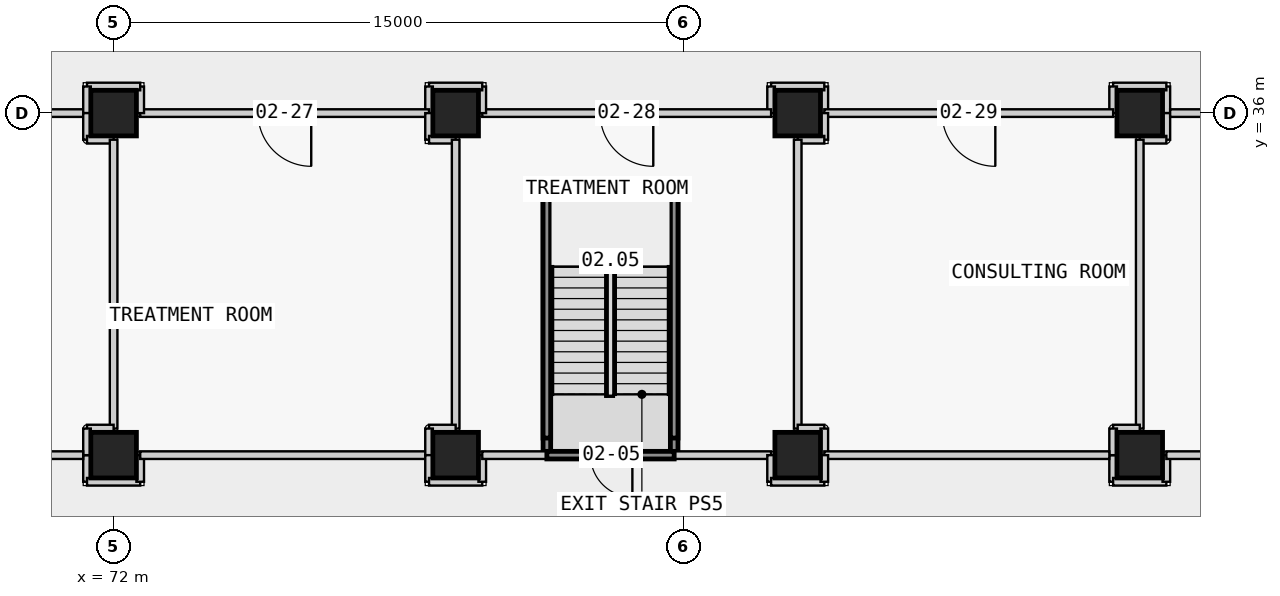
"""IFC4 building model, lengths in metres.
Left out: names, types, materials, properties, quantities, classifications, styles, units other than length and angle.
Written with IfcOpenShell. Run it as: python <this file> out.ifc"""

import sys

from ifc_helpers import new_model, si_unit, direction, frame, frame_2d, origin, origin_2d, place, context, subcontext, project, spatial, rectangle, extrude, element, fill, save


model = new_model("IFC4")
c1 = context("Model", 3, precision=1e-05, world=origin(), true_north=direction((0.0, 1.0)))
c2 = subcontext(c1, "Body", "Model", "MODEL_VIEW")
j1 = project(units=[si_unit("LENGTHUNIT", "METRE"), si_unit("PLANEANGLEUNIT", "RADIAN")], contexts=[c1])
p1 = place(None, origin())
s1 = spatial("IfcSite", under=j1, at=p1, CompositionType="ELEMENT")
p2 = place(p1, origin())
s2 = spatial("IfcBuilding", under=s1, at=p2, CompositionType="ELEMENT")
p3 = place(p2, frame((0.0, 0.0, 12.8)))
s3 = spatial("IfcBuildingStorey", under=s2, at=p3, CompositionType="ELEMENT", Elevation=12.8)
for number, where, z_axis, x_axis in (
    (1, (72.0, 27.0, 0.0), (0.0, 0.0, 1.0), (1.0, 0.0, 0.0)),
    (2, (72.0, 36.0, 0.0), (0.0, 0.0, 1.0), (1.0, 0.0, 0.0)),
    (3, (81.0, 27.0, 0.0), (0.0, 0.0, 1.0), (1.0, 0.0, 0.0)),
    (4, (81.0, 36.0, 0.0), (0.0, 0.0, 1.0), (1.0, 0.0, 0.0)),
    (5, (90.0, 27.0, 0.0), (0.0, 0.0, 1.0), (1.0, 0.0, 0.0)),
    (6, (90.0, 36.0, 0.0), (0.0, 0.0, 1.0), (1.0, 0.0, 0.0)),
    (7, (99.0, 27.0, 0.0), (0.0, 0.0, 1.0), (1.0, 0.0, 0.0)),
    (8, (99.0, 36.0, 0.0), (0.0, 0.0, 1.0), (1.0, 0.0, 0.0)),
):
    element("IfcColumn", number, at=place(p3, frame(where, z_axis=z_axis, x_axis=x_axis)), inside=s3, PredefinedType="COLUMN", context=c2, shape_type="SweptSolid", body=[
        extrude(rectangle(XDim=1.2, YDim=1.2, at=origin_2d()), origin(), (0.0, 0.0, 1.0), 4.5),
    ])
p4 = place(p3, frame((71.3, 36.0, 0.0), z_axis=(0.0, 0.0, 1.0), x_axis=(-1.0, 0.0, 0.0)))
e9 = element("IfcWall", 9, at=p4, inside=s3, PredefinedType="PARTITIONING", context=c2, shape_type="SweptSolid", body=[
    extrude(rectangle(XDim=7.6, YDim=0.2, at=frame_2d((3.8, 0.0))), origin(), (0.0, 0.0, 1.0), 3.45),
])
p5 = place(p4, frame((3.35, 0.0, 0.0)))
e10 = element("IfcOpeningElement", 10, at=p5, cuts=e9, PredefinedType="OPENING", context=c2, shape_type="SweptSolid", body=[
    extrude(rectangle(XDim=0.9, YDim=2.1, at=frame_2d((0.45, 1.05))), frame((0.0, 0.11, 0.0), z_axis=(0.0, -1.0, 0.0), x_axis=(1.0, 0.0, 0.0)), (0.0, 0.0, 1.0), 0.22),
])
p6 = place(p3, frame((83.4, 27.0, 0.0), z_axis=(0.0, 0.0, 1.0), x_axis=(0.0, 1.0, 0.0)))
e11 = element("IfcWall", 11, at=p6, inside=s3, PredefinedType="PARTITIONING", context=c2, shape_type="SweptSolid", body=[
    extrude(rectangle(XDim=6.9, YDim=0.2, at=frame_2d((3.45, 0.0))), origin(), (0.0, 0.0, 1.0), 3.45),
])
p7 = place(p3, frame((83.4, 33.9, 0.0), z_axis=(0.0, 0.0, 1.0), x_axis=(1.0, 0.0, 0.0)))
e12 = element("IfcWall", 12, at=p7, inside=s3, PredefinedType="PARTITIONING", context=c2, shape_type="SweptSolid", body=[
    extrude(rectangle(XDim=3.35, YDim=0.2, at=frame_2d((1.675, 0.0))), origin(), (0.0, 0.0, 1.0), 4.15),
])
p8 = place(p3, frame((86.75, 33.9, 0.0), z_axis=(0.0, 0.0, 1.0), x_axis=(0.0, -1.0, 0.0)))
e13 = element("IfcWall", 13, at=p8, inside=s3, PredefinedType="PARTITIONING", context=c2, shape_type="SweptSolid", body=[
    extrude(rectangle(XDim=6.9, YDim=0.2, at=frame_2d((3.45, 0.0))), origin(), (0.0, 0.0, 1.0), 3.45),
])
p9 = place(p3, frame((90.7, 36.0, 0.0), z_axis=(0.0, 0.0, 1.0), x_axis=(0.0, 1.0, 0.0)))
e14 = element("IfcWall", 14, at=p9, inside=s3, PredefinedType="PARTITIONING", context=c2, shape_type="SweptSolid", body=[
    extrude(rectangle(XDim=0.7, YDim=0.2, at=frame_2d((0.35, 0.0))), origin(), (0.0, 0.0, 1.0), 3.45),
])
p10 = place(p3, frame((90.7, 36.7, 0.0), z_axis=(0.0, 0.0, 1.0), x_axis=(-1.0, 0.0, 0.0)))
e15 = element("IfcWall", 15, at=p10, inside=s3, PredefinedType="PARTITIONING", context=c2, shape_type="SweptSolid", body=[
    extrude(rectangle(XDim=1.4, YDim=0.2, at=frame_2d((0.7, 0.0))), origin(), (0.0, 0.0, 1.0), 3.45),
])
p11 = place(p3, frame((89.3, 36.7, 0.0), z_axis=(0.0, 0.0, 1.0), x_axis=(0.0, -1.0, 0.0)))
e16 = element("IfcWall", 16, at=p11, inside=s3, PredefinedType="PARTITIONING", context=c2, shape_type="SweptSolid", body=[
    extrude(rectangle(XDim=0.7, YDim=0.2, at=frame_2d((0.35, 0.0))), origin(), (0.0, 0.0, 1.0), 3.45),
])
p12 = place(p3, frame((89.3, 36.0, 0.0), z_axis=(0.0, 0.0, 1.0), x_axis=(-1.0, 0.0, 0.0)))
e17 = element("IfcWall", 17, at=p12, inside=s3, PredefinedType="PARTITIONING", context=c2, shape_type="SweptSolid", body=[
    extrude(rectangle(XDim=7.6, YDim=0.2, at=frame_2d((3.8, 0.0))), origin(), (0.0, 0.0, 1.0), 3.45),
])
p13 = place(p12, frame((3.1, 0.0, 0.0)))
e18 = element("IfcOpeningElement", 18, at=p13, cuts=e17, PredefinedType="OPENING", context=c2, shape_type="SweptSolid", body=[
    extrude(rectangle(XDim=1.4, YDim=2.1, at=frame_2d((0.7, 1.05))), frame((0.0, 0.11, 0.0), z_axis=(0.0, -1.0, 0.0), x_axis=(1.0, 0.0, 0.0)), (0.0, 0.0, 1.0), 0.22),
])
p14 = place(p3, frame((81.7, 36.0, 0.0), z_axis=(0.0, 0.0, 1.0), x_axis=(0.0, 1.0, 0.0)))
e19 = element("IfcWall", 19, at=p14, inside=s3, PredefinedType="PARTITIONING", context=c2, shape_type="SweptSolid", body=[
    extrude(rectangle(XDim=0.7, YDim=0.2, at=frame_2d((0.35, 0.0))), origin(), (0.0, 0.0, 1.0), 3.45),
])
p15 = place(p3, frame((81.7, 36.7, 0.0), z_axis=(0.0, 0.0, 1.0), x_axis=(-1.0, 0.0, 0.0)))
e20 = element("IfcWall", 20, at=p15, inside=s3, PredefinedType="PARTITIONING", context=c2, shape_type="SweptSolid", body=[
    extrude(rectangle(XDim=1.4, YDim=0.2, at=frame_2d((0.7, 0.0))), origin(), (0.0, 0.0, 1.0), 3.45),
])
for number, where, z_axis, x_axis in (
    (21, (80.3, 36.7, 0.0), (0.0, 0.0, 1.0), (0.0, -1.0, 0.0)),
    (22, (98.3, 27.0, 0.0), (0.0, 0.0, 1.0), (0.0, -1.0, 0.0)),
):
    element("IfcWall", number, at=place(p3, frame(where, z_axis=z_axis, x_axis=x_axis)), inside=s3, PredefinedType="PARTITIONING", context=c2, shape_type="SweptSolid", body=[
        extrude(rectangle(XDim=0.7, YDim=0.2, at=frame_2d((0.35, 0.0))), origin(), (0.0, 0.0, 1.0), 3.45),
    ])
p16 = place(p3, frame((98.3, 26.3, 0.0), z_axis=(0.0, 0.0, 1.0), x_axis=(1.0, 0.0, 0.0)))
e23 = element("IfcWall", 23, at=p16, inside=s3, PredefinedType="PARTITIONING", context=c2, shape_type="SweptSolid", body=[
    extrude(rectangle(XDim=1.4, YDim=0.2, at=frame_2d((0.7, 0.0))), origin(), (0.0, 0.0, 1.0), 4.15),
])
p17 = place(p3, frame((99.7, 26.3, 0.0), z_axis=(0.0, 0.0, 1.0), x_axis=(0.0, 1.0, 0.0)))
e24 = element("IfcWall", 24, at=p17, inside=s3, PredefinedType="PARTITIONING", context=c2, shape_type="SweptSolid", body=[
    extrude(rectangle(XDim=0.7, YDim=0.2, at=frame_2d((0.35, 0.0))), origin(), (0.0, 0.0, 1.0), 3.45),
])
p18 = place(p3, frame((99.7, 27.0, 0.0), z_axis=(0.0, 0.0, 1.0), x_axis=(1.0, 0.0, 0.0)))
e25 = element("IfcWall", 25, at=p18, inside=s3, PredefinedType="PARTITIONING", context=c2, shape_type="SweptSolid", body=[
    extrude(rectangle(XDim=6.1, YDim=0.2, at=frame_2d((3.05, 0.0))), origin(), (0.0, 0.0, 1.0), 3.45),
])
p19 = place(p18, frame((2.6, 0.0, 0.0)))
e26 = element("IfcOpeningElement", 26, at=p19, cuts=e25, PredefinedType="OPENING", context=c2, shape_type="SweptSolid", body=[
    extrude(rectangle(XDim=0.9, YDim=2.1, at=frame_2d((0.45, 1.05))), frame((0.0, 0.11, 0.0), z_axis=(0.0, -1.0, 0.0), x_axis=(1.0, 0.0, 0.0)), (0.0, 0.0, 1.0), 0.22),
])
p20 = place(p3, frame((80.3, 36.0, 0.0), z_axis=(0.0, 0.0, 1.0), x_axis=(-1.0, 0.0, 0.0)))
e27 = element("IfcWall", 27, at=p20, inside=s3, PredefinedType="PARTITIONING", context=c2, shape_type="SweptSolid", body=[
    extrude(rectangle(XDim=7.6, YDim=0.2, at=frame_2d((3.8, 0.0))), origin(), (0.0, 0.0, 1.0), 3.45),
])
p21 = place(p20, frame((3.1, 0.0, 0.0)))
e28 = element("IfcOpeningElement", 28, at=p21, cuts=e27, PredefinedType="OPENING", context=c2, shape_type="SweptSolid", body=[
    extrude(rectangle(XDim=1.4, YDim=2.1, at=frame_2d((0.7, 1.05))), frame((0.0, 0.11, 0.0), z_axis=(0.0, -1.0, 0.0), x_axis=(1.0, 0.0, 0.0)), (0.0, 0.0, 1.0), 0.22),
])
p22 = place(p3, frame((72.7, 36.0, 0.0), z_axis=(0.0, 0.0, 1.0), x_axis=(0.0, 1.0, 0.0)))
e29 = element("IfcWall", 29, at=p22, inside=s3, PredefinedType="PARTITIONING", context=c2, shape_type="SweptSolid", body=[
    extrude(rectangle(XDim=0.7, YDim=0.2, at=frame_2d((0.35, 0.0))), origin(), (0.0, 0.0, 1.0), 3.45),
])
p23 = place(p3, frame((72.7, 36.7, 0.0), z_axis=(0.0, 0.0, 1.0), x_axis=(-1.0, 0.0, 0.0)))
e30 = element("IfcWall", 30, at=p23, inside=s3, PredefinedType="PARTITIONING", context=c2, shape_type="SweptSolid", body=[
    extrude(rectangle(XDim=1.4, YDim=0.2, at=frame_2d((0.7, 0.0))), origin(), (0.0, 0.0, 1.0), 3.45),
])
for number, where, z_axis, x_axis in (
    (31, (71.3, 36.7, 0.0), (0.0, 0.0, 1.0), (0.0, -1.0, 0.0)),
    (32, (99.7, 36.0, 0.0), (0.0, 0.0, 1.0), (0.0, 1.0, 0.0)),
):
    element("IfcWall", number, at=place(p3, frame(where, z_axis=z_axis, x_axis=x_axis)), inside=s3, PredefinedType="PARTITIONING", context=c2, shape_type="SweptSolid", body=[
        extrude(rectangle(XDim=0.7, YDim=0.2, at=frame_2d((0.35, 0.0))), origin(), (0.0, 0.0, 1.0), 3.45),
    ])
p24 = place(p3, frame((99.7, 36.7, 0.0), z_axis=(0.0, 0.0, 1.0), x_axis=(-1.0, 0.0, 0.0)))
e33 = element("IfcWall", 33, at=p24, inside=s3, PredefinedType="PARTITIONING", context=c2, shape_type="SweptSolid", body=[
    extrude(rectangle(XDim=1.4, YDim=0.2, at=frame_2d((0.7, 0.0))), origin(), (0.0, 0.0, 1.0), 3.45),
])
p25 = place(p3, frame((98.3, 36.7, 0.0), z_axis=(0.0, 0.0, 1.0), x_axis=(0.0, -1.0, 0.0)))
e34 = element("IfcWall", 34, at=p25, inside=s3, PredefinedType="PARTITIONING", context=c2, shape_type="SweptSolid", body=[
    extrude(rectangle(XDim=0.7, YDim=0.2, at=frame_2d((0.35, 0.0))), origin(), (0.0, 0.0, 1.0), 3.45),
])
p26 = place(p3, frame((98.3, 36.0, 0.0), z_axis=(0.0, 0.0, 1.0), x_axis=(-1.0, 0.0, 0.0)))
e35 = element("IfcWall", 35, at=p26, inside=s3, PredefinedType="PARTITIONING", context=c2, shape_type="SweptSolid", body=[
    extrude(rectangle(XDim=7.6, YDim=0.2, at=frame_2d((3.8, 0.0))), origin(), (0.0, 0.0, 1.0), 3.45),
])
p27 = place(p26, frame((3.1, 0.0, 0.0)))
e36 = element("IfcOpeningElement", 36, at=p27, cuts=e35, PredefinedType="OPENING", context=c2, shape_type="SweptSolid", body=[
    extrude(rectangle(XDim=1.4, YDim=2.1, at=frame_2d((0.7, 1.05))), frame((0.0, 0.11, 0.0), z_axis=(0.0, -1.0, 0.0), x_axis=(1.0, 0.0, 0.0)), (0.0, 0.0, 1.0), 0.22),
])
p28 = place(p3, frame((71.3, 27.0, 0.0), z_axis=(0.0, 0.0, 1.0), x_axis=(0.0, -1.0, 0.0)))
e37 = element("IfcWall", 37, at=p28, inside=s3, PredefinedType="PARTITIONING", context=c2, shape_type="SweptSolid", body=[
    extrude(rectangle(XDim=0.7, YDim=0.2, at=frame_2d((0.35, 0.0))), origin(), (0.0, 0.0, 1.0), 3.45),
])
p29 = place(p3, frame((71.3, 26.3, 0.0), z_axis=(0.0, 0.0, 1.0), x_axis=(1.0, 0.0, 0.0)))
e38 = element("IfcWall", 38, at=p29, inside=s3, PredefinedType="PARTITIONING", context=c2, shape_type="SweptSolid", body=[
    extrude(rectangle(XDim=1.4, YDim=0.2, at=frame_2d((0.7, 0.0))), origin(), (0.0, 0.0, 1.0), 4.15),
])
p30 = place(p3, frame((72.7, 26.3, 0.0), z_axis=(0.0, 0.0, 1.0), x_axis=(0.0, 1.0, 0.0)))
e39 = element("IfcWall", 39, at=p30, inside=s3, PredefinedType="PARTITIONING", context=c2, shape_type="SweptSolid", body=[
    extrude(rectangle(XDim=0.7, YDim=0.2, at=frame_2d((0.35, 0.0))), origin(), (0.0, 0.0, 1.0), 3.45),
])
p31 = place(p3, frame((72.7, 27.0, 0.0), z_axis=(0.0, 0.0, 1.0), x_axis=(1.0, 0.0, 0.0)))
e40 = element("IfcWall", 40, at=p31, inside=s3, PredefinedType="PARTITIONING", context=c2, shape_type="SweptSolid", body=[
    extrude(rectangle(XDim=7.6, YDim=0.2, at=frame_2d((3.8, 0.0))), origin(), (0.0, 0.0, 1.0), 3.45),
])
for number, where, z_axis, x_axis in (
    (41, (80.3, 36.0, 0.0), (0.0, 0.0, 1.0), (0.0, -1.0, 0.0)),
    (42, (80.3, 35.3, 0.0), (0.0, 0.0, 1.0), (1.0, 0.0, 0.0)),
):
    element("IfcWall", number, at=place(p3, frame(where, z_axis=z_axis, x_axis=x_axis)), inside=s3, PredefinedType="PARTITIONING", context=c2, shape_type="SweptSolid", body=[
        extrude(rectangle(XDim=0.7, YDim=0.2, at=frame_2d((0.35, 0.0))), origin(), (0.0, 0.0, 1.0), 3.45),
    ])
p32 = place(p3, frame((81.0, 35.3, 0.0), z_axis=(0.0, 0.0, 1.0), x_axis=(0.0, -1.0, 0.0)))
e43 = element("IfcWall", 43, at=p32, inside=s3, PredefinedType="PARTITIONING", context=c2, shape_type="SweptSolid", body=[
    extrude(rectangle(XDim=7.6, YDim=0.2, at=frame_2d((3.8, 0.0))), origin(), (0.0, 0.0, 1.0), 3.45),
])
for number, where, z_axis, x_axis in (
    (44, (81.0, 27.7, 0.0), (0.0, 0.0, 1.0), (-1.0, 0.0, 0.0)),
    (45, (80.3, 27.7, 0.0), (0.0, 0.0, 1.0), (0.0, -1.0, 0.0)),
    (46, (99.7, 36.0, 0.0), (0.0, 0.0, 1.0), (0.0, -1.0, 0.0)),
    (47, (99.7, 35.3, 0.0), (0.0, 0.0, 1.0), (-1.0, 0.0, 0.0)),
):
    element("IfcWall", number, at=place(p3, frame(where, z_axis=z_axis, x_axis=x_axis)), inside=s3, PredefinedType="PARTITIONING", context=c2, shape_type="SweptSolid", body=[
        extrude(rectangle(XDim=0.7, YDim=0.2, at=frame_2d((0.35, 0.0))), origin(), (0.0, 0.0, 1.0), 3.45),
    ])
p33 = place(p3, frame((99.0, 35.3, 0.0), z_axis=(0.0, 0.0, 1.0), x_axis=(0.0, -1.0, 0.0)))
e48 = element("IfcWall", 48, at=p33, inside=s3, PredefinedType="PARTITIONING", context=c2, shape_type="SweptSolid", body=[
    extrude(rectangle(XDim=7.6, YDim=0.2, at=frame_2d((3.8, 0.0))), origin(), (0.0, 0.0, 1.0), 3.45),
])
for number, where, z_axis, x_axis in (
    (49, (99.0, 27.7, 0.0), (0.0, 0.0, 1.0), (-1.0, 0.0, 0.0)),
    (50, (98.3, 27.7, 0.0), (0.0, 0.0, 1.0), (0.0, -1.0, 0.0)),
    (51, (71.3, 36.0, 0.0), (0.0, 0.0, 1.0), (0.0, -1.0, 0.0)),
    (52, (71.3, 35.3, 0.0), (0.0, 0.0, 1.0), (1.0, 0.0, 0.0)),
):
    element("IfcWall", number, at=place(p3, frame(where, z_axis=z_axis, x_axis=x_axis)), inside=s3, PredefinedType="PARTITIONING", context=c2, shape_type="SweptSolid", body=[
        extrude(rectangle(XDim=0.7, YDim=0.2, at=frame_2d((0.35, 0.0))), origin(), (0.0, 0.0, 1.0), 3.45),
    ])
p34 = place(p3, frame((72.0, 35.3, 0.0), z_axis=(0.0, 0.0, 1.0), x_axis=(0.0, -1.0, 0.0)))
e53 = element("IfcWall", 53, at=p34, inside=s3, PredefinedType="PARTITIONING", context=c2, shape_type="SweptSolid", body=[
    extrude(rectangle(XDim=7.6, YDim=0.2, at=frame_2d((3.8, 0.0))), origin(), (0.0, 0.0, 1.0), 3.45),
])
for number, where, z_axis, x_axis in (
    (54, (72.0, 27.7, 0.0), (0.0, 0.0, 1.0), (-1.0, 0.0, 0.0)),
    (55, (71.3, 27.7, 0.0), (0.0, 0.0, 1.0), (0.0, -1.0, 0.0)),
    (56, (90.7, 36.0, 0.0), (0.0, 0.0, 1.0), (0.0, -1.0, 0.0)),
    (57, (90.7, 35.3, 0.0), (0.0, 0.0, 1.0), (-1.0, 0.0, 0.0)),
):
    element("IfcWall", number, at=place(p3, frame(where, z_axis=z_axis, x_axis=x_axis)), inside=s3, PredefinedType="PARTITIONING", context=c2, shape_type="SweptSolid", body=[
        extrude(rectangle(XDim=0.7, YDim=0.2, at=frame_2d((0.35, 0.0))), origin(), (0.0, 0.0, 1.0), 3.45),
    ])
p35 = place(p3, frame((90.0, 35.3, 0.0), z_axis=(0.0, 0.0, 1.0), x_axis=(0.0, -1.0, 0.0)))
e58 = element("IfcWall", 58, at=p35, inside=s3, PredefinedType="PARTITIONING", context=c2, shape_type="SweptSolid", body=[
    extrude(rectangle(XDim=7.6, YDim=0.2, at=frame_2d((3.8, 0.0))), origin(), (0.0, 0.0, 1.0), 3.45),
])
for number, where, z_axis, x_axis in (
    (59, (90.0, 27.7, 0.0), (0.0, 0.0, 1.0), (1.0, 0.0, 0.0)),
    (60, (90.7, 27.7, 0.0), (0.0, 0.0, 1.0), (0.0, -1.0, 0.0)),
):
    element("IfcWall", number, at=place(p3, frame(where, z_axis=z_axis, x_axis=x_axis)), inside=s3, PredefinedType="PARTITIONING", context=c2, shape_type="SweptSolid", body=[
        extrude(rectangle(XDim=0.7, YDim=0.2, at=frame_2d((0.35, 0.0))), origin(), (0.0, 0.0, 1.0), 3.45),
    ])
p36 = place(p3, frame((105.8, 36.0, 0.0), z_axis=(0.0, 0.0, 1.0), x_axis=(-1.0, 0.0, 0.0)))
e61 = element("IfcWall", 61, at=p36, inside=s3, PredefinedType="PARTITIONING", context=c2, shape_type="SweptSolid", body=[
    extrude(rectangle(XDim=6.0, YDim=0.2, at=frame_2d((3.0, 0.0))), origin(), (0.0, 0.0, 1.0), 3.45),
])
p37 = place(p3, frame((90.7, 27.0, 0.0), z_axis=(0.0, 0.0, 1.0), x_axis=(1.0, 0.0, 0.0)))
e62 = element("IfcWall", 62, at=p37, inside=s3, PredefinedType="PARTITIONING", context=c2, shape_type="SweptSolid", body=[
    extrude(rectangle(XDim=7.5, YDim=0.2, at=frame_2d((3.75, 0.0))), origin(), (0.0, 0.0, 1.0), 3.45),
])
p38 = place(p3, frame((63.8, 27.0, 0.0), z_axis=(0.0, 0.0, 1.0), x_axis=(1.0, 0.0, 0.0)))
e63 = element("IfcWall", 63, at=p38, inside=s3, PredefinedType="PARTITIONING", context=c2, shape_type="SweptSolid", body=[
    extrude(rectangle(XDim=7.4, YDim=0.2, at=frame_2d((3.7, 0.0))), origin(), (0.0, 0.0, 1.0), 3.45),
])
p39 = place(p3, frame((86.75, 27.0, 0.0), z_axis=(0.0, 0.0, 1.0), x_axis=(1.0, 0.0, 0.0)))
e64 = element("IfcWall", 64, at=p39, inside=s3, PredefinedType="PARTITIONING", context=c2, shape_type="SweptSolid", body=[
    extrude(rectangle(XDim=2.55, YDim=0.2, at=frame_2d((1.275, 0.0))), origin(), (0.0, 0.0, 1.0), 3.45),
])
p40 = place(p3, frame((89.3, 27.0, 0.0), z_axis=(0.0, 0.0, 1.0), x_axis=(0.0, -1.0, 0.0)))
e65 = element("IfcWall", 65, at=p40, inside=s3, PredefinedType="PARTITIONING", context=c2, shape_type="SweptSolid", body=[
    extrude(rectangle(XDim=0.7, YDim=0.2, at=frame_2d((0.35, 0.0))), origin(), (0.0, 0.0, 1.0), 3.45),
])
p41 = place(p3, frame((89.3, 26.3, 0.0), z_axis=(0.0, 0.0, 1.0), x_axis=(1.0, 0.0, 0.0)))
e66 = element("IfcWall", 66, at=p41, inside=s3, PredefinedType="PARTITIONING", context=c2, shape_type="SweptSolid", body=[
    extrude(rectangle(XDim=1.4, YDim=0.2, at=frame_2d((0.7, 0.0))), origin(), (0.0, 0.0, 1.0), 4.15),
])
for number, where, z_axis, x_axis in (
    (67, (90.7, 26.3, 0.0), (0.0, 0.0, 1.0), (0.0, 1.0, 0.0)),
    (68, (80.3, 27.0, 0.0), (0.0, 0.0, 1.0), (0.0, -1.0, 0.0)),
):
    element("IfcWall", number, at=place(p3, frame(where, z_axis=z_axis, x_axis=x_axis)), inside=s3, PredefinedType="PARTITIONING", context=c2, shape_type="SweptSolid", body=[
        extrude(rectangle(XDim=0.7, YDim=0.2, at=frame_2d((0.35, 0.0))), origin(), (0.0, 0.0, 1.0), 3.45),
    ])
p42 = place(p3, frame((80.3, 26.3, 0.0), z_axis=(0.0, 0.0, 1.0), x_axis=(1.0, 0.0, 0.0)))
e69 = element("IfcWall", 69, at=p42, inside=s3, PredefinedType="PARTITIONING", context=c2, shape_type="SweptSolid", body=[
    extrude(rectangle(XDim=1.4, YDim=0.2, at=frame_2d((0.7, 0.0))), origin(), (0.0, 0.0, 1.0), 4.15),
])
p43 = place(p3, frame((81.7, 26.3, 0.0), z_axis=(0.0, 0.0, 1.0), x_axis=(0.0, 1.0, 0.0)))
e70 = element("IfcWall", 70, at=p43, inside=s3, PredefinedType="PARTITIONING", context=c2, shape_type="SweptSolid", body=[
    extrude(rectangle(XDim=0.7, YDim=0.2, at=frame_2d((0.35, 0.0))), origin(), (0.0, 0.0, 1.0), 3.45),
])
p44 = place(p3, frame((81.7, 27.0, 0.0), z_axis=(0.0, 0.0, 1.0), x_axis=(1.0, 0.0, 0.0)))
e71 = element("IfcWall", 71, at=p44, inside=s3, PredefinedType="PARTITIONING", context=c2, shape_type="SweptSolid", body=[
    extrude(rectangle(XDim=1.7, YDim=0.2, at=frame_2d((0.85, 0.0))), origin(), (0.0, 0.0, 1.0), 3.45),
])
p45 = place(p3, frame((86.75, 27.0, 0.0), z_axis=(0.0, 0.0, 1.0), x_axis=(-1.0, 0.0, 0.0)))
e72 = element("IfcWall", 72, at=p45, inside=s3, PredefinedType="PARTITIONING", context=c2, shape_type="SweptSolid", body=[
    extrude(rectangle(XDim=3.35, YDim=0.2, at=frame_2d((1.675, 0.0))), origin(), (0.0, 0.0, 1.0), 3.45),
])
p46 = place(p45, frame((1.1, 0.0, 0.0)))
e73 = element("IfcOpeningElement", 73, at=p46, cuts=e72, PredefinedType="OPENING", context=c2, shape_type="SweptSolid", body=[
    extrude(rectangle(XDim=1.1, YDim=2.1, at=frame_2d((0.55, 1.05))), frame((0.0, 0.11, 0.0), z_axis=(0.0, -1.0, 0.0), x_axis=(1.0, 0.0, 0.0)), (0.0, 0.0, 1.0), 0.22),
])
for number, where, z_axis, x_axis in (
    (74, (83.4, 27.45, 3.45), (0.0, 0.0, 1.0), (0.0, 1.0, 0.0)),
    (75, (86.75, 33.9, 3.45), (0.0, 0.0, 1.0), (0.0, -1.0, 0.0)),
):
    element("IfcWall", number, at=place(p3, frame(where, z_axis=z_axis, x_axis=x_axis)), inside=s3, PredefinedType="PARTITIONING", context=c2, shape_type="SweptSolid", body=[
        extrude(rectangle(XDim=6.45, YDim=0.2, at=frame_2d((3.225, 0.0))), origin(), (0.0, 0.0, 1.0), 0.7),
    ])
p47 = place(p46, origin())
e76 = element("IfcDoor", 76, at=p47, inside=s3, OperationType="SINGLE_SWING_LEFT", PredefinedType="DOOR", context=c2, shape_type="SweptSolid", body=[
    extrude(rectangle(XDim=1.1, YDim=2.1, at=frame_2d((0.55, 1.05))), frame((0.0, 0.025, 0.0), z_axis=(0.0, -1.0, 0.0), x_axis=(1.0, 0.0, 0.0)), (0.0, 0.0, 1.0), 0.05),
])
fill(e73, e76)
p48 = place(p21, origin())
e77 = element("IfcDoor", 77, at=p48, inside=s3, OperationType="SINGLE_SWING_LEFT", PredefinedType="DOOR", context=c2, shape_type="SweptSolid", body=[
    extrude(rectangle(XDim=1.4, YDim=2.1, at=frame_2d((0.7, 1.05))), frame((0.0, 0.025, 0.0), z_axis=(0.0, -1.0, 0.0), x_axis=(1.0, 0.0, 0.0)), (0.0, 0.0, 1.0), 0.05),
])
fill(e28, e77)
p49 = place(p13, origin())
e78 = element("IfcDoor", 78, at=p49, inside=s3, OperationType="SINGLE_SWING_LEFT", PredefinedType="DOOR", context=c2, shape_type="SweptSolid", body=[
    extrude(rectangle(XDim=1.4, YDim=2.1, at=frame_2d((0.7, 1.05))), frame((0.0, 0.025, 0.0), z_axis=(0.0, -1.0, 0.0), x_axis=(1.0, 0.0, 0.0)), (0.0, 0.0, 1.0), 0.05),
])
fill(e18, e78)
p50 = place(p27, origin())
e79 = element("IfcDoor", 79, at=p50, inside=s3, OperationType="SINGLE_SWING_LEFT", PredefinedType="DOOR", context=c2, shape_type="SweptSolid", body=[
    extrude(rectangle(XDim=1.4, YDim=2.1, at=frame_2d((0.7, 1.05))), frame((0.0, 0.025, 0.0), z_axis=(0.0, -1.0, 0.0), x_axis=(1.0, 0.0, 0.0)), (0.0, 0.0, 1.0), 0.05),
])
fill(e36, e79)
save(model, sys.argv[1])
